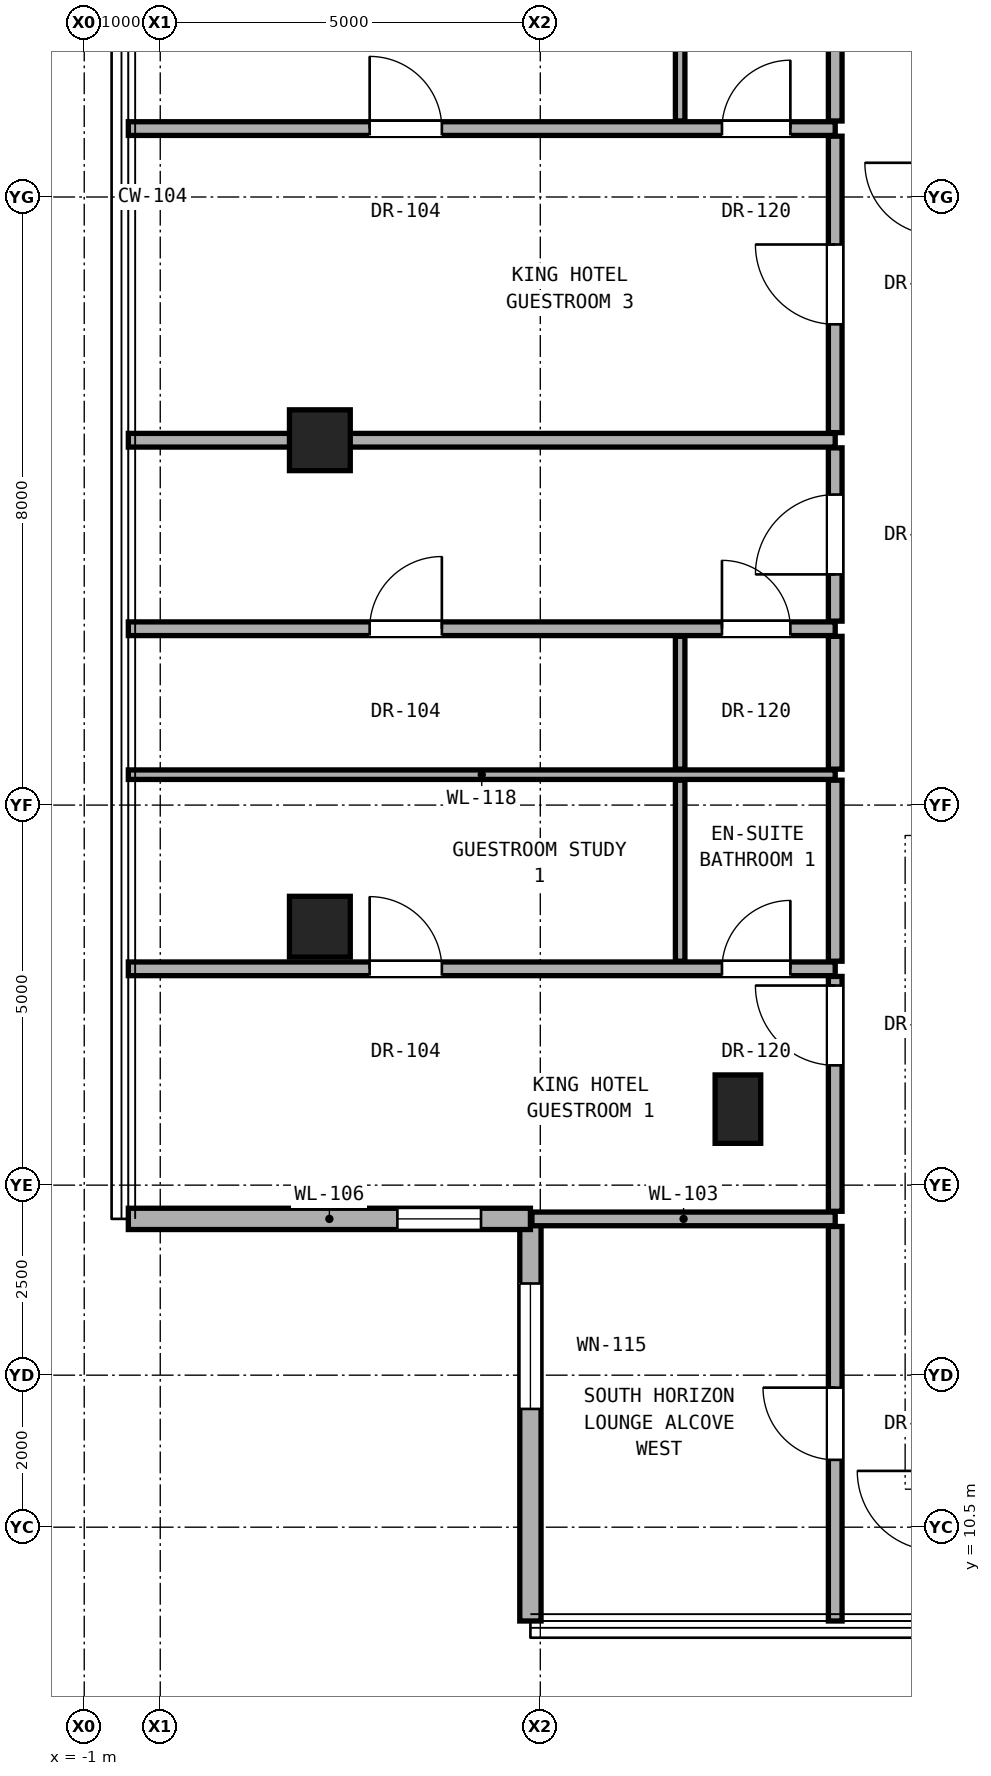
"""IFC4 building model, lengths in metres.
Left out: names, types, materials, properties, quantities, classifications, styles, units other than length and angle.
Written with IfcOpenShell. Run it as: python <this file> out.ifc"""

import sys

from ifc_helpers import new_model, si_unit, direction, frame, frame_2d, origin, origin_2d, place, context, subcontext, project, spatial, rectangle, hollow_rectangle, extrude, element, fill, save


model = new_model("IFC4")
c1 = context("Model", 3, precision=1e-05, world=origin(), true_north=direction((0.0, 1.0)))
c2 = subcontext(c1, "Body", "Model", "MODEL_VIEW")
j1 = project(units=[si_unit("LENGTHUNIT", "METRE"), si_unit("PLANEANGLEUNIT", "RADIAN")], contexts=[c1])
p1 = place(None, origin())
s1 = spatial("IfcSite", under=j1, at=p1, CompositionType="ELEMENT")
p2 = place(p1, origin())
s2 = spatial("IfcBuilding", under=s1, at=p2, CompositionType="ELEMENT")
p3 = place(p2, frame((0.0, 0.0, 229.3)))
s3 = spatial("IfcBuildingStorey", under=s2, at=p3, CompositionType="ELEMENT", Elevation=229.3)
for number, where, z_axis, x_axis in (
    (1, (2.1, 18.4, 0.0), (0.0, 0.0, 1.0), (1.0, 0.0, 0.0)),
    (2, (2.1, 24.8, 0.0), (0.0, 0.0, 1.0), (1.0, 0.0, 0.0)),
):
    element("IfcColumn", number, at=place(p3, frame(where, z_axis=z_axis, x_axis=x_axis)), inside=s3, PredefinedType="COLUMN", context=c2, shape_type="SweptSolid", body=[
        extrude(hollow_rectangle(XDim=0.8, YDim=0.8, WallThickness=0.045, at=origin_2d()), origin(), (0.0, 0.0, 1.0), 3.3),
    ])
p4 = place(p3, frame((7.6, 16.0, 0.0), z_axis=(0.0, 0.0, 1.0), x_axis=(1.0, 0.0, 0.0)))
e3 = element("IfcColumn", 3, at=p4, inside=s3, PredefinedType="PILASTER", context=c2, shape_type="SweptSolid", body=[
    extrude(rectangle(XDim=0.6, YDim=0.9, at=origin_2d()), origin(), (0.0, 0.0, 1.0), 3.3),
])
p5 = place(p3, frame((4.87, 14.556, 0.0), z_axis=(0.0, 0.0, 1.0), x_axis=(0.0, -1.0, 0.0)))
e4 = element("IfcWall", 4, at=p5, inside=s3, PredefinedType="SOLIDWALL", context=c2, shape_type="SweptSolid", body=[
    extrude(rectangle(XDim=5.29, YDim=0.28, at=frame_2d((2.645, 0.0))), origin(), (0.0, 0.0, 1.0), 3.08),
])
p6 = place(p5, frame((0.85, 0.0, 0.73)))
e5 = element("IfcOpeningElement", 5, at=p6, cuts=e4, PredefinedType="OPENING", context=c2, shape_type="SweptSolid", body=[
    extrude(rectangle(XDim=1.65, YDim=2.2, at=frame_2d((0.825, 1.1))), frame((0.0, 0.15, 0.0), z_axis=(0.0, -1.0, 0.0), x_axis=(1.0, 0.0, 0.0)), (0.0, 0.0, 1.0), 0.3),
])
p7 = place(p3, frame((-0.42, 14.556, 0.0), z_axis=(0.0, 0.0, 1.0), x_axis=(1.0, 0.0, 0.0)))
e6 = element("IfcWall", 6, at=p7, inside=s3, PredefinedType="SOLIDWALL", context=c2, shape_type="SweptSolid", body=[
    extrude(rectangle(XDim=5.29, YDim=0.28, at=frame_2d((2.645, 0.0))), origin(), (0.0, 0.0, 1.0), 3.08),
])
p8 = place(p7, frame((3.54, 0.0, 0.85)))
e7 = element("IfcOpeningElement", 7, at=p8, cuts=e6, PredefinedType="OPENING", context=c2, shape_type="SweptSolid", body=[
    extrude(rectangle(XDim=1.1, YDim=2.0, at=frame_2d((0.55, 1.0))), frame((0.0, 0.15, 0.0), z_axis=(0.0, -1.0, 0.0), x_axis=(1.0, 0.0, 0.0)), (0.0, 0.0, 1.0), 0.3),
])
p9 = place(p3, frame((4.89, 14.556, 0.0), z_axis=(0.0, 0.0, 1.0), x_axis=(1.0, 0.0, 0.0)))
e8 = element("IfcWall", 8, at=p9, inside=s3, PredefinedType="PARTITIONING", context=c2, shape_type="SweptSolid", body=[
    extrude(rectangle(XDim=3.99, YDim=0.18, at=frame_2d((1.995, 0.0))), origin(), (0.0, 0.0, 1.0), 3.1),
])
p10 = place(p3, frame((-0.42, 17.846, 0.0), z_axis=(0.0, 0.0, 1.0), x_axis=(1.0, 0.0, 0.0)))
e9 = element("IfcWall", 9, at=p10, inside=s3, PredefinedType="PARTITIONING", context=c2, shape_type="SweptSolid", body=[
    extrude(rectangle(XDim=9.3, YDim=0.18, at=frame_2d((4.65, 0.0))), origin(), (0.0, 0.0, 1.0), 2.543),
])
p11 = place(p10, frame((3.175, 0.0, 0.0)))
e10 = element("IfcOpeningElement", 10, at=p11, cuts=e9, PredefinedType="OPENING", context=c2, shape_type="SweptSolid", body=[
    extrude(rectangle(XDim=0.95, YDim=2.15, at=frame_2d((0.475, 1.075))), frame((0.0, 0.1, 0.0), z_axis=(0.0, -1.0, 0.0), x_axis=(1.0, 0.0, 0.0)), (0.0, 0.0, 1.0), 0.2),
])
p12 = place(p10, frame((7.81, 0.0, 0.0)))
e11 = element("IfcOpeningElement", 11, at=p12, cuts=e9, PredefinedType="OPENING", context=c2, shape_type="SweptSolid", body=[
    extrude(rectangle(XDim=0.9, YDim=2.1, at=frame_2d((0.45, 1.05))), frame((0.0, 0.1, 0.0), z_axis=(0.0, -1.0, 0.0), x_axis=(1.0, 0.0, 0.0)), (0.0, 0.0, 1.0), 0.2),
])
p13 = place(p3, frame((-0.42, 20.4, 0.0), z_axis=(0.0, 0.0, 1.0), x_axis=(1.0, 0.0, 0.0)))
e12 = element("IfcWall", 12, at=p13, inside=s3, PredefinedType="PARTITIONING", context=c2, shape_type="SweptSolid", body=[
    extrude(rectangle(XDim=9.3, YDim=0.125, at=frame_2d((4.65, 0.0))), origin(), (0.0, 0.0, 1.0), 2.319),
])
p14 = place(p3, frame((-0.42, 22.32, 0.0), z_axis=(0.0, 0.0, 1.0), x_axis=(1.0, 0.0, 0.0)))
e13 = element("IfcWall", 13, at=p14, inside=s3, PredefinedType="PARTITIONING", context=c2, shape_type="SweptSolid", body=[
    extrude(rectangle(XDim=9.3, YDim=0.18, at=frame_2d((4.65, 0.0))), origin(), (0.0, 0.0, 1.0), 2.319),
])
p15 = place(p14, frame((3.175, 0.0, 0.0)))
e14 = element("IfcOpeningElement", 14, at=p15, cuts=e13, PredefinedType="OPENING", context=c2, shape_type="SweptSolid", body=[
    extrude(rectangle(XDim=0.95, YDim=2.15, at=frame_2d((0.475, 1.075))), frame((0.0, 0.1, 0.0), z_axis=(0.0, -1.0, 0.0), x_axis=(1.0, 0.0, 0.0)), (0.0, 0.0, 1.0), 0.2),
])
p16 = place(p14, frame((7.81, 0.0, 0.0)))
e15 = element("IfcOpeningElement", 15, at=p16, cuts=e13, PredefinedType="OPENING", context=c2, shape_type="SweptSolid", body=[
    extrude(rectangle(XDim=0.9, YDim=2.1, at=frame_2d((0.45, 1.05))), frame((0.0, 0.1, 0.0), z_axis=(0.0, -1.0, 0.0), x_axis=(1.0, 0.0, 0.0)), (0.0, 0.0, 1.0), 0.2),
])
p17 = place(p3, frame((-0.42, 24.8, 0.0), z_axis=(0.0, 0.0, 1.0), x_axis=(1.0, 0.0, 0.0)))
e16 = element("IfcWall", 16, at=p17, inside=s3, PredefinedType="PARTITIONING", context=c2, shape_type="SweptSolid", body=[
    extrude(rectangle(XDim=9.3, YDim=0.18, at=frame_2d((4.65, 0.0))), origin(), (0.0, 0.0, 1.0), 2.319),
])
p18 = place(p3, frame((-0.42, 28.9, 0.0), z_axis=(0.0, 0.0, 1.0), x_axis=(1.0, 0.0, 0.0)))
e17 = element("IfcWall", 17, at=p18, inside=s3, PredefinedType="PARTITIONING", context=c2, shape_type="SweptSolid", body=[
    extrude(rectangle(XDim=9.3, YDim=0.18, at=frame_2d((4.65, 0.0))), origin(), (0.0, 0.0, 1.0), 2.319),
])
p19 = place(p18, frame((3.175, 0.0, 0.0)))
e18 = element("IfcOpeningElement", 18, at=p19, cuts=e17, PredefinedType="OPENING", context=c2, shape_type="SweptSolid", body=[
    extrude(rectangle(XDim=0.95, YDim=2.15, at=frame_2d((0.475, 1.075))), frame((0.0, 0.1, 0.0), z_axis=(0.0, -1.0, 0.0), x_axis=(1.0, 0.0, 0.0)), (0.0, 0.0, 1.0), 0.2),
])
p20 = place(p18, frame((7.81, 0.0, 0.0)))
e19 = element("IfcOpeningElement", 19, at=p20, cuts=e17, PredefinedType="OPENING", context=c2, shape_type="SweptSolid", body=[
    extrude(rectangle(XDim=0.9, YDim=2.1, at=frame_2d((0.45, 1.05))), frame((0.0, 0.1, 0.0), z_axis=(0.0, -1.0, 0.0), x_axis=(1.0, 0.0, 0.0)), (0.0, 0.0, 1.0), 0.2),
])
p21 = place(p3, frame((6.84, 17.946, 0.0), z_axis=(0.0, 0.0, 1.0), x_axis=(0.0, 1.0, 0.0)))
e20 = element("IfcWall", 20, at=p21, inside=s3, PredefinedType="PARTITIONING", context=c2, shape_type="SweptSolid", body=[
    extrude(rectangle(XDim=2.381, YDim=0.125, at=frame_2d((1.191, 0.0))), origin(), (0.0, 0.0, 1.0), 2.492),
])
p22 = place(p3, frame((6.84, 20.472, 0.0), z_axis=(0.0, 0.0, 1.0), x_axis=(0.0, 1.0, 0.0)))
e21 = element("IfcWall", 21, at=p22, inside=s3, PredefinedType="PARTITIONING", context=c2, shape_type="SweptSolid", body=[
    extrude(rectangle(XDim=1.748, YDim=0.125, at=frame_2d((0.874, 0.0))), origin(), (0.0, 0.0, 1.0), 3.1),
])
p23 = place(p3, frame((6.84, 29.0, 0.0), z_axis=(0.0, 0.0, 1.0), x_axis=(0.0, 1.0, 0.0)))
e22 = element("IfcWall", 22, at=p23, inside=s3, PredefinedType="PARTITIONING", context=c2, shape_type="SweptSolid", body=[
    extrude(rectangle(XDim=2.127, YDim=0.125, at=frame_2d((1.064, 0.0))), origin(), (0.0, 0.0, 1.0), 2.396),
])
p24 = place(p3, frame((8.88, 9.266, 0.0), z_axis=(0.0, 0.0, 1.0), x_axis=(0.0, 1.0, 0.0)))
e23 = element("IfcWall", 23, at=p24, inside=s3, PredefinedType="PARTITIONING", context=c2, shape_type="SweptSolid", body=[
    extrude(rectangle(XDim=5.19, YDim=0.18, at=frame_2d((2.595, 0.0))), origin(), (0.0, 0.0, 1.0), 3.1),
])
p25 = place(p24, frame((2.12, 0.0, 0.0)))
e24 = element("IfcOpeningElement", 24, at=p25, cuts=e23, PredefinedType="OPENING", context=c2, shape_type="SweptSolid", body=[
    extrude(rectangle(XDim=0.95, YDim=2.15, at=frame_2d((0.475, 1.075))), frame((0.0, 0.1, 0.0), z_axis=(0.0, -1.0, 0.0), x_axis=(1.0, 0.0, 0.0)), (0.0, 0.0, 1.0), 0.2),
])
p26 = place(p3, frame((8.88, 14.656, 0.0), z_axis=(0.0, 0.0, 1.0), x_axis=(0.0, 1.0, 0.0)))
e25 = element("IfcWall", 25, at=p26, inside=s3, PredefinedType="PARTITIONING", context=c2, shape_type="SweptSolid", body=[
    extrude(rectangle(XDim=3.09, YDim=0.18, at=frame_2d((1.545, 0.0))), origin(), (0.0, 0.0, 1.0), 2.543),
])
p27 = place(p26, frame((1.92, 0.0, 0.0)))
e26 = element("IfcOpeningElement", 26, at=p27, cuts=e25, PredefinedType="OPENING", context=c2, shape_type="SweptSolid", body=[
    extrude(rectangle(XDim=1.05, YDim=2.2, at=frame_2d((0.525, 1.1))), frame((0.0, 0.1, 0.0), z_axis=(0.0, -1.0, 0.0), x_axis=(1.0, 0.0, 0.0)), (0.0, 0.0, 1.0), 0.2),
])
p28 = place(p3, frame((8.88, 17.946, 0.0), z_axis=(0.0, 0.0, 1.0), x_axis=(0.0, 1.0, 0.0)))
e27 = element("IfcWall", 27, at=p28, inside=s3, PredefinedType="PARTITIONING", context=c2, shape_type="SweptSolid", body=[
    extrude(rectangle(XDim=2.381, YDim=0.18, at=frame_2d((1.191, 0.0))), origin(), (0.0, 0.0, 1.0), 2.492),
])
p29 = place(p3, frame((8.88, 20.472, 0.0), z_axis=(0.0, 0.0, 1.0), x_axis=(0.0, 1.0, 0.0)))
e28 = element("IfcWall", 28, at=p29, inside=s3, PredefinedType="PARTITIONING", context=c2, shape_type="SweptSolid", body=[
    extrude(rectangle(XDim=1.748, YDim=0.18, at=frame_2d((0.874, 0.0))), origin(), (0.0, 0.0, 1.0), 3.1),
])
p30 = place(p3, frame((8.88, 22.42, 0.0), z_axis=(0.0, 0.0, 1.0), x_axis=(0.0, 1.0, 0.0)))
e29 = element("IfcWall", 29, at=p30, inside=s3, PredefinedType="PARTITIONING", context=c2, shape_type="SweptSolid", body=[
    extrude(rectangle(XDim=2.28, YDim=0.18, at=frame_2d((1.14, 0.0))), origin(), (0.0, 0.0, 1.0), 2.396),
])
p31 = place(p30, frame((0.615, 0.0, 0.0)))
e30 = element("IfcOpeningElement", 30, at=p31, cuts=e29, PredefinedType="OPENING", context=c2, shape_type="SweptSolid", body=[
    extrude(rectangle(XDim=1.05, YDim=2.2, at=frame_2d((0.525, 1.1))), frame((0.0, 0.1, 0.0), z_axis=(0.0, -1.0, 0.0), x_axis=(1.0, 0.0, 0.0)), (0.0, 0.0, 1.0), 0.2),
])
p32 = place(p3, frame((8.88, 24.9, 0.0), z_axis=(0.0, 0.0, 1.0), x_axis=(0.0, 1.0, 0.0)))
e31 = element("IfcWall", 31, at=p32, inside=s3, PredefinedType="PARTITIONING", context=c2, shape_type="SweptSolid", body=[
    extrude(rectangle(XDim=3.9, YDim=0.18, at=frame_2d((1.95, 0.0))), origin(), (0.0, 0.0, 1.0), 2.396),
])
p33 = place(p32, frame((1.425, 0.0, 0.0)))
e32 = element("IfcOpeningElement", 32, at=p33, cuts=e31, PredefinedType="OPENING", context=c2, shape_type="SweptSolid", body=[
    extrude(rectangle(XDim=1.05, YDim=2.2, at=frame_2d((0.525, 1.1))), frame((0.0, 0.1, 0.0), z_axis=(0.0, -1.0, 0.0), x_axis=(1.0, 0.0, 0.0)), (0.0, 0.0, 1.0), 0.2),
])
p34 = place(p3, frame((8.88, 29.0, 0.0), z_axis=(0.0, 0.0, 1.0), x_axis=(0.0, 1.0, 0.0)))
e33 = element("IfcWall", 33, at=p34, inside=s3, PredefinedType="PARTITIONING", context=c2, shape_type="SweptSolid", body=[
    extrude(rectangle(XDim=2.127, YDim=0.18, at=frame_2d((1.064, 0.0))), origin(), (0.0, 0.0, 1.0), 2.396),
])
p35 = place(p6, origin())
e34 = element("IfcWindow", 34, at=p35, inside=s3, PartitioningType="SINGLE_PANEL", PredefinedType="WINDOW", context=c2, shape_type="SweptSolid", body=[
    extrude(rectangle(XDim=1.65, YDim=2.2, at=frame_2d((0.825, 1.1))), frame((0.0, 0.03, 0.0), z_axis=(0.0, -1.0, 0.0), x_axis=(1.0, 0.0, 0.0)), (0.0, 0.0, 1.0), 0.06),
])
fill(e5, e34)
p36 = place(p8, origin())
e35 = element("IfcWindow", 35, at=p36, inside=s3, PartitioningType="SINGLE_PANEL", PredefinedType="WINDOW", context=c2, shape_type="SweptSolid", body=[
    extrude(rectangle(XDim=1.1, YDim=2.0, at=frame_2d((0.55, 1.0))), frame((0.0, 0.03, 0.0), z_axis=(0.0, -1.0, 0.0), x_axis=(1.0, 0.0, 0.0)), (0.0, 0.0, 1.0), 0.06),
])
fill(e7, e35)
p37 = place(p27, origin())
e36 = element("IfcDoor", 36, at=p37, inside=s3, OperationType="SINGLE_SWING_RIGHT", PredefinedType="DOOR", context=c2, shape_type="SweptSolid", body=[
    extrude(rectangle(XDim=1.05, YDim=2.2, at=frame_2d((0.525, 1.1))), frame((0.0, 0.025, 0.0), z_axis=(0.0, -1.0, 0.0), x_axis=(1.0, 0.0, 0.0)), (0.0, 0.0, 1.0), 0.05),
])
fill(e26, e36)
p38 = place(p11, origin())
e37 = element("IfcDoor", 37, at=p38, inside=s3, OperationType="SINGLE_SWING_LEFT", PredefinedType="DOOR", context=c2, shape_type="SweptSolid", body=[
    extrude(rectangle(XDim=0.95, YDim=2.15, at=frame_2d((0.475, 1.075))), frame((0.0, 0.025, 0.0), z_axis=(0.0, -1.0, 0.0), x_axis=(1.0, 0.0, 0.0)), (0.0, 0.0, 1.0), 0.05),
])
fill(e10, e37)
p39 = place(p12, origin())
e38 = element("IfcDoor", 38, at=p39, inside=s3, OperationType="SINGLE_SWING_RIGHT", PredefinedType="DOOR", context=c2, shape_type="SweptSolid", body=[
    extrude(rectangle(XDim=0.9, YDim=2.1, at=frame_2d((0.45, 1.05))), frame((0.0, 0.025, 0.0), z_axis=(0.0, -1.0, 0.0), x_axis=(1.0, 0.0, 0.0)), (0.0, 0.0, 1.0), 0.05),
])
fill(e11, e38)
p40 = place(p31, origin())
e39 = element("IfcDoor", 39, at=p40, inside=s3, OperationType="SINGLE_SWING_LEFT", PredefinedType="DOOR", context=c2, shape_type="SweptSolid", body=[
    extrude(rectangle(XDim=1.05, YDim=2.2, at=frame_2d((0.525, 1.1))), frame((0.0, 0.025, 0.0), z_axis=(0.0, -1.0, 0.0), x_axis=(1.0, 0.0, 0.0)), (0.0, 0.0, 1.0), 0.05),
])
fill(e30, e39)
p41 = place(p15, origin())
e40 = element("IfcDoor", 40, at=p41, inside=s3, OperationType="SINGLE_SWING_RIGHT", PredefinedType="DOOR", context=c2, shape_type="SweptSolid", body=[
    extrude(rectangle(XDim=0.95, YDim=2.15, at=frame_2d((0.475, 1.075))), frame((0.0, 0.025, 0.0), z_axis=(0.0, -1.0, 0.0), x_axis=(1.0, 0.0, 0.0)), (0.0, 0.0, 1.0), 0.05),
])
fill(e14, e40)
p42 = place(p16, origin())
e41 = element("IfcDoor", 41, at=p42, inside=s3, OperationType="SINGLE_SWING_LEFT", PredefinedType="DOOR", context=c2, shape_type="SweptSolid", body=[
    extrude(rectangle(XDim=0.9, YDim=2.1, at=frame_2d((0.45, 1.05))), frame((0.0, 0.025, 0.0), z_axis=(0.0, -1.0, 0.0), x_axis=(1.0, 0.0, 0.0)), (0.0, 0.0, 1.0), 0.05),
])
fill(e15, e41)
p43 = place(p33, origin())
e42 = element("IfcDoor", 42, at=p43, inside=s3, OperationType="SINGLE_SWING_RIGHT", PredefinedType="DOOR", context=c2, shape_type="SweptSolid", body=[
    extrude(rectangle(XDim=1.05, YDim=2.2, at=frame_2d((0.525, 1.1))), frame((0.0, 0.025, 0.0), z_axis=(0.0, -1.0, 0.0), x_axis=(1.0, 0.0, 0.0)), (0.0, 0.0, 1.0), 0.05),
])
fill(e32, e42)
p44 = place(p19, origin())
e43 = element("IfcDoor", 43, at=p44, inside=s3, OperationType="SINGLE_SWING_LEFT", PredefinedType="DOOR", context=c2, shape_type="SweptSolid", body=[
    extrude(rectangle(XDim=0.95, YDim=2.15, at=frame_2d((0.475, 1.075))), frame((0.0, 0.025, 0.0), z_axis=(0.0, -1.0, 0.0), x_axis=(1.0, 0.0, 0.0)), (0.0, 0.0, 1.0), 0.05),
])
fill(e18, e43)
p45 = place(p20, origin())
e44 = element("IfcDoor", 44, at=p45, inside=s3, OperationType="SINGLE_SWING_RIGHT", PredefinedType="DOOR", context=c2, shape_type="SweptSolid", body=[
    extrude(rectangle(XDim=0.9, YDim=2.1, at=frame_2d((0.45, 1.05))), frame((0.0, 0.025, 0.0), z_axis=(0.0, -1.0, 0.0), x_axis=(1.0, 0.0, 0.0)), (0.0, 0.0, 1.0), 0.05),
])
fill(e19, e44)
p46 = place(p25, origin())
e45 = element("IfcDoor", 45, at=p46, inside=s3, OperationType="SINGLE_SWING_RIGHT", PredefinedType="DOOR", context=c2, shape_type="SweptSolid", body=[
    extrude(rectangle(XDim=0.95, YDim=2.15, at=frame_2d((0.475, 1.075))), frame((0.0, 0.025, 0.0), z_axis=(0.0, -1.0, 0.0), x_axis=(1.0, 0.0, 0.0)), (0.0, 0.0, 1.0), 0.05),
])
fill(e24, e45)
save(model, sys.argv[1])
